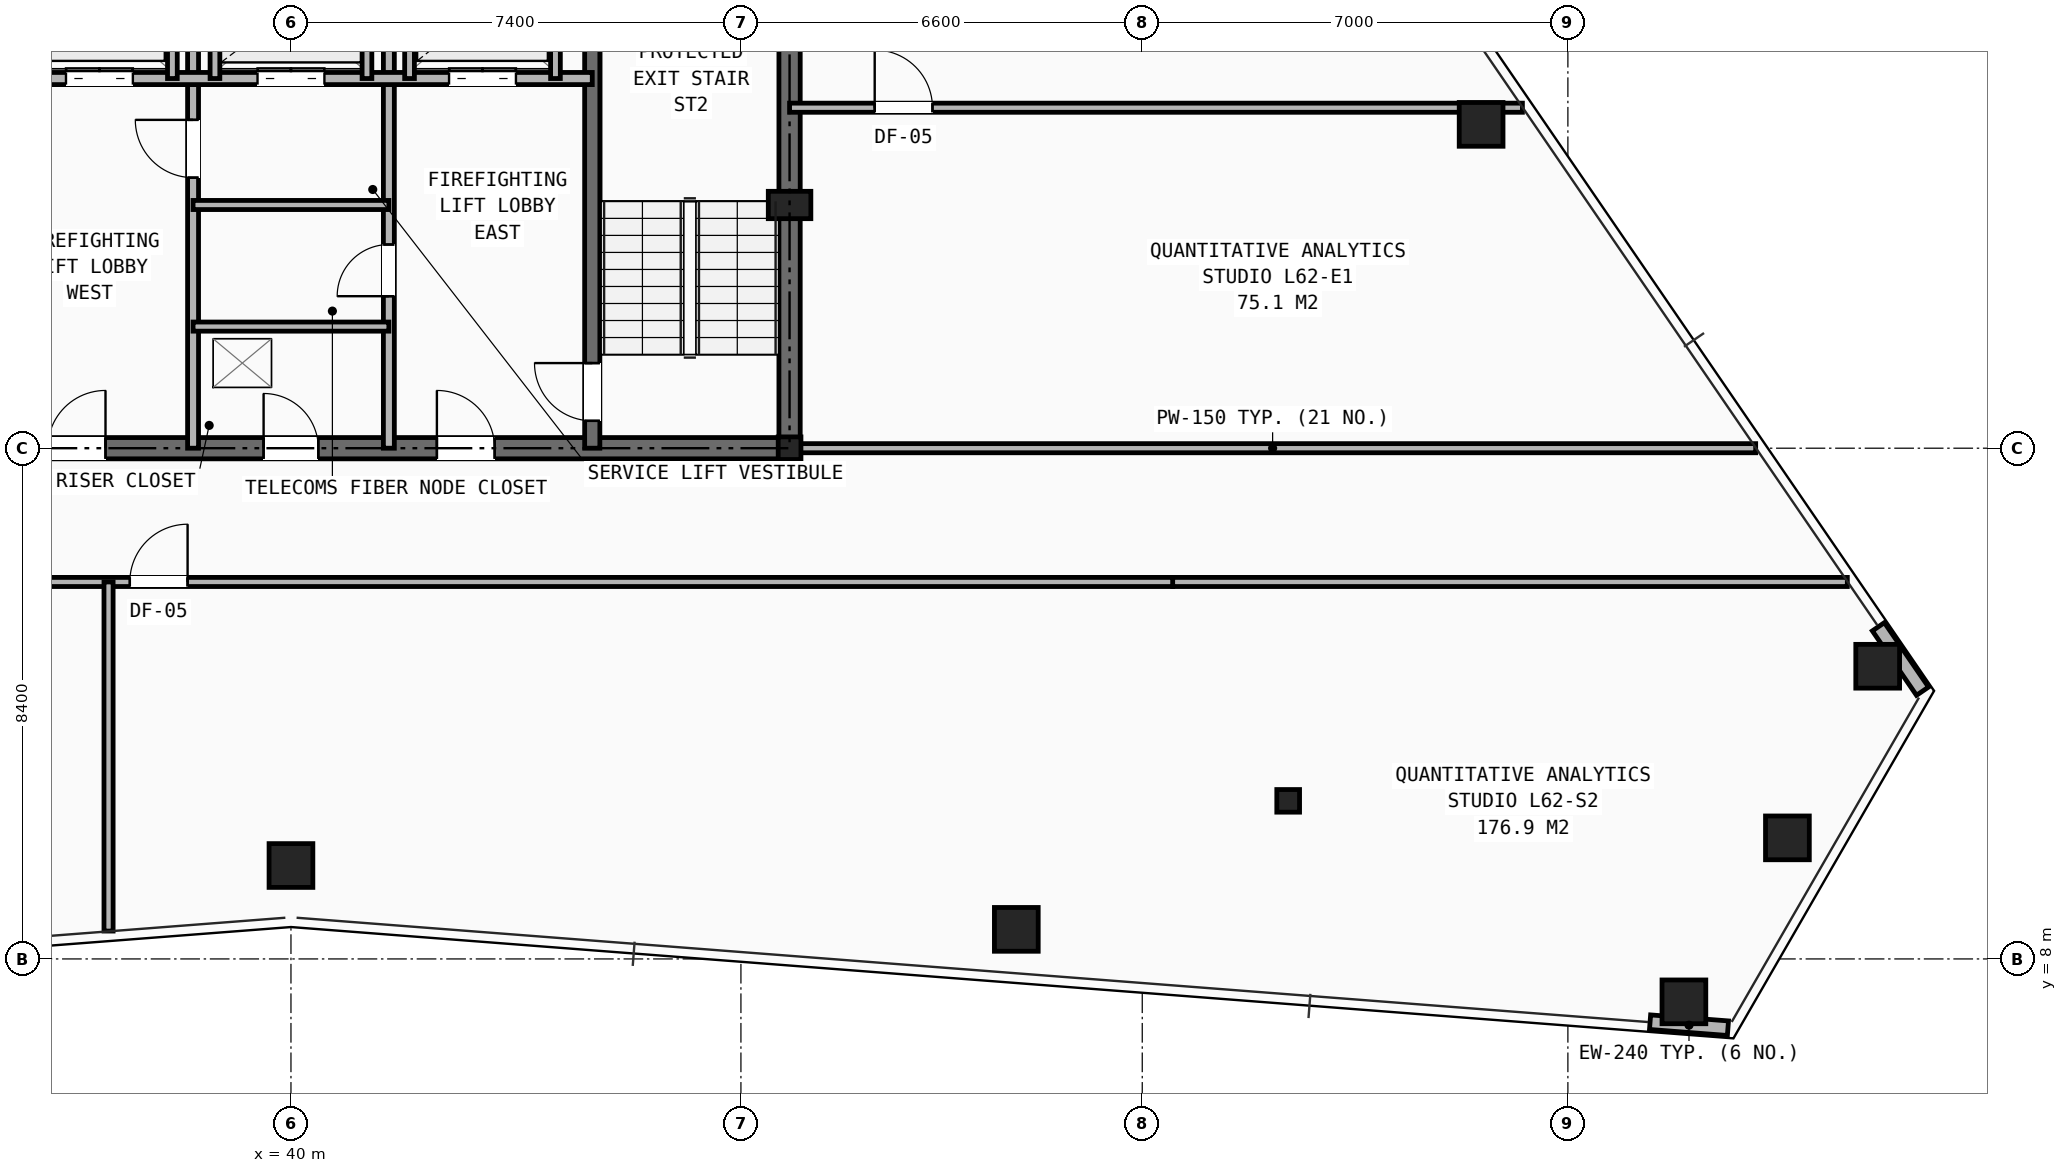
"""IFC4 building model, lengths in metres.
Left out: names, types, materials, properties, quantities, classifications, styles, units other than length and angle.
Written with IfcOpenShell. Run it as: python <this file> out.ifc"""

import sys

from ifc_helpers import new_model, si_unit, direction, frame, frame_2d, origin, origin_2d, place, context, subcontext, project, spatial, rectangle, hollow_rectangle, i_section, extrude, element, fill, save


model = new_model("IFC4")
c1 = context("Model", 3, precision=1e-05, world=origin(), true_north=direction((0.0, 1.0)))
c2 = subcontext(c1, "Body", "Model", "MODEL_VIEW")
j1 = project(units=[si_unit("LENGTHUNIT", "METRE"), si_unit("PLANEANGLEUNIT", "RADIAN")], contexts=[c1])
p1 = place(None, origin())
s1 = spatial("IfcSite", under=j1, at=p1, CompositionType="ELEMENT")
p2 = place(p1, origin())
s2 = spatial("IfcBuilding", under=s1, at=p2, CompositionType="ELEMENT")
p3 = place(p2, frame((0.0, 0.0, 218.9)))
s3 = spatial("IfcBuildingStorey", under=s2, at=p3, CompositionType="ELEMENT", Elevation=218.9)
for number, where, z_axis, x_axis in (
    (1, (48.2, 16.4, 0.0), (0.0, 0.0, 1.0), (1.0, 0.0, 0.0)),
    (2, (56.4, 10.6, 0.0), (0.0, 0.0, 1.0), (1.0, 0.0, 0.0)),
):
    element("IfcColumn", number, at=place(p3, frame(where, z_axis=z_axis, x_axis=x_axis)), inside=s3, PredefinedType="COLUMN", context=c2, shape_type="SweptSolid", body=[
        extrude(i_section(OverallWidth=0.374, OverallDepth=0.372, WebThickness=0.016, FlangeThickness=0.026, at=origin_2d()), origin(), (0.0, 0.0, 1.0), 3.5),
    ])
p4 = place(p3, frame((48.2, 20.4, 0.0), z_axis=(0.0, 0.0, 1.0), x_axis=(1.0, 0.0, 0.0)))
e3 = element("IfcColumn", 3, at=p4, inside=s3, PredefinedType="PILASTER", context=c2, shape_type="SweptSolid", body=[
    extrude(rectangle(XDim=0.7, YDim=0.45, at=origin_2d()), origin(), (0.0, 0.0, 1.0), 3.5),
])
for number, where, z_axis, x_axis in (
    (4, (40.0, 9.537, 0.0), (0.0, 0.0, 1.0), (1.0, 0.0, 0.0)),
    (5, (51.929, 8.486, 0.0), (0.0, 0.0, 1.0), (1.0, 0.0, 0.0)),
    (6, (62.908, 7.294, 0.0), (0.0, 0.0, 1.0), (1.0, 0.0, 0.0)),
    (7, (64.61, 9.991, 0.0), (0.0, 0.0, 1.0), (1.0, 0.0, 0.0)),
    (8, (66.095, 12.814, 0.0), (0.0, 0.0, 1.0), (1.0, 0.0, 0.0)),
    (9, (59.573, 21.726, 0.0), (0.0, 0.0, 1.0), (1.0, 0.0, 0.0)),
):
    element("IfcColumn", number, at=place(p3, frame(where, z_axis=z_axis, x_axis=x_axis)), inside=s3, PredefinedType="COLUMN", context=c2, shape_type="SweptSolid", body=[
        extrude(hollow_rectangle(XDim=0.72, YDim=0.72, WallThickness=0.05, at=origin_2d()), origin(), (0.0, 0.0, 1.0), 3.5),
    ])
p5 = place(p3, frame((62.351, 6.96, 0.0), z_axis=(0.0, 0.0, 1.0), x_axis=(0.997033205721, -0.076972635974, 0.0)))
e10 = element("IfcWall", 10, at=p5, inside=s3, PredefinedType="SHEAR", context=c2, shape_type="SweptSolid", body=[
    extrude(rectangle(XDim=1.285, YDim=0.24, at=frame_2d((0.642, 0.0))), origin(), (0.0, 0.0, 1.0), 2.623),
])
p6 = place(p3, frame((66.832, 12.404, 0.0), z_axis=(0.0, 0.0, 1.0), x_axis=(-0.565269764291, 0.824906111978, 0.0)))
e11 = element("IfcWall", 11, at=p6, inside=s3, PredefinedType="SHEAR", context=c2, shape_type="SweptSolid", body=[
    extrude(rectangle(XDim=1.284, YDim=0.24, at=frame_2d((0.642, 0.0))), origin(), (0.0, 0.0, 1.0), 2.623),
])
p7 = place(p3, frame((31.8, 16.4, 0.0), z_axis=(0.0, 0.0, 1.0), x_axis=(1.0, 0.0, 0.0)))
e12 = element("IfcWall", 12, at=p7, inside=s3, PredefinedType="SHEAR", context=c2, shape_type="SweptSolid", body=[
    extrude(rectangle(XDim=16.4, YDim=0.35, at=frame_2d((8.2, 0.0))), origin(), (0.0, 0.0, 1.0), 3.25),
])
p8 = place(p7, frame((7.75, 0.0, 0.0)))
e13 = element("IfcOpeningElement", 13, at=p8, cuts=e12, PredefinedType="OPENING", context=c2, shape_type="SweptSolid", body=[
    extrude(rectangle(XDim=0.9, YDim=2.1, at=frame_2d((0.45, 1.05))), frame((0.0, 0.185, 0.0), z_axis=(0.0, -1.0, 0.0), x_axis=(1.0, 0.0, 0.0)), (0.0, 0.0, 1.0), 0.37),
])
p9 = place(p7, frame((4.2, 0.0, 0.0)))
e14 = element("IfcOpeningElement", 14, at=p9, cuts=e12, PredefinedType="OPENING", context=c2, shape_type="SweptSolid", body=[
    extrude(rectangle(XDim=0.95, YDim=2.1, at=frame_2d((0.475, 1.05))), frame((0.0, 0.185, 0.0), z_axis=(0.0, -1.0, 0.0), x_axis=(1.0, 0.0, 0.0)), (0.0, 0.0, 1.0), 0.37),
])
p10 = place(p7, frame((10.6, 0.0, 0.0)))
e15 = element("IfcOpeningElement", 15, at=p10, cuts=e12, PredefinedType="OPENING", context=c2, shape_type="SweptSolid", body=[
    extrude(rectangle(XDim=0.95, YDim=2.1, at=frame_2d((0.475, 1.05))), frame((0.0, 0.185, 0.0), z_axis=(0.0, -1.0, 0.0), x_axis=(1.0, 0.0, 0.0)), (0.0, 0.0, 1.0), 0.37),
])
p11 = place(p3, frame((48.2, 16.4, 0.0), z_axis=(0.0, 0.0, 1.0), x_axis=(0.0, 1.0, 0.0)))
e16 = element("IfcWall", 16, at=p11, inside=s3, PredefinedType="SHEAR", context=c2, shape_type="SweptSolid", body=[
    extrude(rectangle(XDim=14.8, YDim=0.35, at=frame_2d((7.4, 0.0))), origin(), (0.0, 0.0, 1.0), 3.25),
])
p12 = place(p11, frame((11.0, 0.0, 0.0)))
e17 = element("IfcOpeningElement", 17, at=p12, cuts=e16, PredefinedType="OPENING", context=c2, shape_type="SweptSolid", body=[
    extrude(rectangle(XDim=1.1, YDim=2.15, at=frame_2d((0.55, 1.075))), frame((0.0, 0.185, 0.0), z_axis=(0.0, -1.0, 0.0), x_axis=(1.0, 0.0, 0.0)), (0.0, 0.0, 1.0), 0.37),
])
p13 = place(p3, frame((44.955, 16.4, 0.0), z_axis=(0.0, 0.0, 1.0), x_axis=(0.0, 1.0, 0.0)))
e18 = element("IfcWall", 18, at=p13, inside=s3, PredefinedType="SHEAR", context=c2, shape_type="SweptSolid", body=[
    extrude(rectangle(XDim=8.4, YDim=0.25, at=frame_2d((4.2, 0.0))), origin(), (0.0, 0.0, 1.0), 3.25),
])
p14 = place(p13, frame((0.45, 0.0, 0.0)))
e19 = element("IfcOpeningElement", 19, at=p14, cuts=e18, PredefinedType="OPENING", context=c2, shape_type="SweptSolid", body=[
    extrude(rectangle(XDim=0.95, YDim=2.1, at=frame_2d((0.475, 1.05))), frame((0.0, 0.135, 0.0), z_axis=(0.0, -1.0, 0.0), x_axis=(1.0, 0.0, 0.0)), (0.0, 0.0, 1.0), 0.27),
])
p15 = place(p3, frame((38.39, 16.4, 0.0), z_axis=(0.0, 0.0, 1.0), x_axis=(0.0, 1.0, 0.0)))
e20 = element("IfcWall", 20, at=p15, inside=s3, PredefinedType="PARTITIONING", context=c2, shape_type="SweptSolid", body=[
    extrude(rectangle(XDim=8.4, YDim=0.18, at=frame_2d((4.2, 0.0))), origin(), (0.0, 0.0, 1.0), 2.705),
])
p16 = place(p15, frame((4.45, 0.0, 0.0)))
e21 = element("IfcOpeningElement", 21, at=p16, cuts=e20, PredefinedType="OPENING", context=c2, shape_type="SweptSolid", body=[
    extrude(rectangle(XDim=0.95, YDim=2.1, at=frame_2d((0.475, 1.05))), frame((0.0, 0.1, 0.0), z_axis=(0.0, -1.0, 0.0), x_axis=(1.0, 0.0, 0.0)), (0.0, 0.0, 1.0), 0.2),
])
p17 = place(p3, frame((41.61, 16.4, 0.0), z_axis=(0.0, 0.0, 1.0), x_axis=(0.0, 1.0, 0.0)))
e22 = element("IfcWall", 22, at=p17, inside=s3, PredefinedType="PARTITIONING", context=c2, shape_type="SweptSolid", body=[
    extrude(rectangle(XDim=8.4, YDim=0.18, at=frame_2d((4.2, 0.0))), origin(), (0.0, 0.0, 1.0), 2.705),
])
p18 = place(p17, frame((2.5, 0.0, 0.0)))
e23 = element("IfcOpeningElement", 23, at=p18, cuts=e22, PredefinedType="OPENING", context=c2, shape_type="SweptSolid", body=[
    extrude(rectangle(XDim=0.85, YDim=2.05, at=frame_2d((0.425, 1.025))), frame((0.0, 0.1, 0.0), z_axis=(0.0, -1.0, 0.0), x_axis=(1.0, 0.0, 0.0)), (0.0, 0.0, 1.0), 0.2),
])
p19 = place(p3, frame((35.045, 22.48, 0.0), z_axis=(0.0, 0.0, 1.0), x_axis=(1.0, 0.0, 0.0)))
e24 = element("IfcWall", 24, at=p19, inside=s3, PredefinedType="SOLIDWALL", context=c2, shape_type="SweptSolid", body=[
    extrude(rectangle(XDim=9.91, YDim=0.2, at=frame_2d((4.955, 0.0))), origin(), (0.0, 0.0, 1.0), 3.25),
])
p20 = place(p19, frame((1.255, 0.0, 0.0)))
e25 = element("IfcOpeningElement", 25, at=p20, cuts=e24, PredefinedType="OPENING", context=c2, shape_type="SweptSolid", body=[
    extrude(rectangle(XDim=1.1, YDim=2.15, at=frame_2d((0.55, 1.075))), frame((0.0, 0.11, 0.0), z_axis=(0.0, -1.0, 0.0), x_axis=(1.0, 0.0, 0.0)), (0.0, 0.0, 1.0), 0.22),
])
p21 = place(p19, frame((7.555, 0.0, 0.0)))
e26 = element("IfcOpeningElement", 26, at=p21, cuts=e24, PredefinedType="OPENING", context=c2, shape_type="SweptSolid", body=[
    extrude(rectangle(XDim=1.1, YDim=2.15, at=frame_2d((0.55, 1.075))), frame((0.0, 0.11, 0.0), z_axis=(0.0, -1.0, 0.0), x_axis=(1.0, 0.0, 0.0)), (0.0, 0.0, 1.0), 0.22),
])
p22 = place(p19, frame((4.405, 0.0, 0.0)))
e27 = element("IfcOpeningElement", 27, at=p22, cuts=e24, PredefinedType="OPENING", context=c2, shape_type="SweptSolid", body=[
    extrude(rectangle(XDim=1.1, YDim=2.15, at=frame_2d((0.55, 1.075))), frame((0.0, 0.11, 0.0), z_axis=(0.0, -1.0, 0.0), x_axis=(1.0, 0.0, 0.0)), (0.0, 0.0, 1.0), 0.22),
])
for number, where, z_axis, x_axis in (
    (28, (38.39, 18.4, 0.0), (0.0, 0.0, 1.0), (1.0, 0.0, 0.0)),
    (29, (38.39, 20.4, 0.0), (0.0, 0.0, 1.0), (1.0, 0.0, 0.0)),
):
    element("IfcWall", number, at=place(p3, frame(where, z_axis=z_axis, x_axis=x_axis)), inside=s3, PredefinedType="PARTITIONING", context=c2, shape_type="SweptSolid", body=[
        extrude(rectangle(XDim=3.22, YDim=0.15, at=frame_2d((1.61, 0.0))), origin(), (0.0, 0.0, 1.0), 3.25),
    ])
for number, where, z_axis, x_axis in (
    (30, (38.05, 22.48, 0.0), (0.0, 0.0, 1.0), (0.0, 1.0, 0.0)),
    (31, (41.95, 22.48, 0.0), (0.0, 0.0, 1.0), (0.0, 1.0, 0.0)),
    (32, (44.35, 22.48, 0.0), (0.0, 0.0, 1.0), (0.0, 1.0, 0.0)),
    (33, (38.75, 22.48, 0.0), (0.0, 0.0, 1.0), (0.0, 1.0, 0.0)),
    (34, (41.25, 22.48, 0.0), (0.0, 0.0, 1.0), (0.0, 1.0, 0.0)),
):
    element("IfcWall", number, at=place(p3, frame(where, z_axis=z_axis, x_axis=x_axis)), inside=s3, PredefinedType="SOLIDWALL", context=c2, shape_type="SweptSolid", body=[
        extrude(rectangle(XDim=2.32, YDim=0.16, at=frame_2d((1.16, 0.0))), origin(), (0.0, 0.0, 1.0), 3.25),
    ])
p23 = place(p3, frame((54.5, 14.2, 0.0), z_axis=(0.0, 0.0, 1.0), x_axis=(1.0, 0.0, 0.0)))
e35 = element("IfcWall", 35, at=p23, inside=s3, PredefinedType="PARTITIONING", context=c2, shape_type="SweptSolid", body=[
    extrude(rectangle(XDim=11.095, YDim=0.15, at=frame_2d((5.548, 0.0))), origin(), (0.0, 0.0, 1.0), 2.292),
])
p24 = place(p3, frame((48.2, 16.4, 0.0), z_axis=(0.0, 0.0, 1.0), x_axis=(1.0, 0.0, 0.0)))
e36 = element("IfcWall", 36, at=p24, inside=s3, PredefinedType="PARTITIONING", context=c2, shape_type="SweptSolid", body=[
    extrude(rectangle(XDim=15.888, YDim=0.15, at=frame_2d((7.944, 0.0))), origin(), (0.0, 0.0, 1.0), 2.292),
])
p25 = place(p3, frame((25.5, 14.2, 0.0), z_axis=(0.0, 0.0, 1.0), x_axis=(1.0, 0.0, 0.0)))
e37 = element("IfcWall", 37, at=p25, inside=s3, PredefinedType="PARTITIONING", context=c2, shape_type="SweptSolid", body=[
    extrude(rectangle(XDim=29.0, YDim=0.15, at=frame_2d((14.5, 0.0))), origin(), (0.0, 0.0, 1.0), 2.292),
])
p26 = place(p25, frame((0.85, 0.0, 0.0)))
e38 = element("IfcOpeningElement", 38, at=p26, cuts=e37, PredefinedType="OPENING", context=c2, shape_type="SweptSolid", body=[
    extrude(rectangle(XDim=0.95, YDim=2.1, at=frame_2d((0.475, 1.05))), frame((0.0, 0.085, 0.0), z_axis=(0.0, -1.0, 0.0), x_axis=(1.0, 0.0, 0.0)), (0.0, 0.0, 1.0), 0.17),
])
p27 = place(p25, frame((11.85, 0.0, 0.0)))
e39 = element("IfcOpeningElement", 39, at=p27, cuts=e37, PredefinedType="OPENING", context=c2, shape_type="SweptSolid", body=[
    extrude(rectangle(XDim=0.95, YDim=2.1, at=frame_2d((0.475, 1.05))), frame((0.0, 0.085, 0.0), z_axis=(0.0, -1.0, 0.0), x_axis=(1.0, 0.0, 0.0)), (0.0, 0.0, 1.0), 0.17),
])
p28 = place(p3, frame((37.0, 8.458, 0.0), z_axis=(0.0, 0.0, 1.0), x_axis=(0.0, 1.0, 0.0)))
e40 = element("IfcWall", 40, at=p28, inside=s3, PredefinedType="PARTITIONING", context=c2, shape_type="SweptSolid", body=[
    extrude(rectangle(XDim=5.741, YDim=0.15, at=frame_2d((2.871, 0.0))), origin(), (0.0, 0.0, 1.0), 2.292),
])
p29 = place(p3, frame((48.2, 22.0, 0.0), z_axis=(0.0, 0.0, 1.0), x_axis=(1.0, 0.0, 0.0)))
e41 = element("IfcWall", 41, at=p29, inside=s3, PredefinedType="PARTITIONING", context=c2, shape_type="SweptSolid", body=[
    extrude(rectangle(XDim=12.052, YDim=0.15, at=frame_2d((6.026, 0.0))), origin(), (0.0, 0.0, 1.0), 2.292),
])
p30 = place(p29, frame((1.4, 0.0, 0.0)))
e42 = element("IfcOpeningElement", 42, at=p30, cuts=e41, PredefinedType="OPENING", context=c2, shape_type="SweptSolid", body=[
    extrude(rectangle(XDim=0.95, YDim=2.1, at=frame_2d((0.475, 1.05))), frame((0.0, 0.085, 0.0), z_axis=(0.0, -1.0, 0.0), x_axis=(1.0, 0.0, 0.0)), (0.0, 0.0, 1.0), 0.17),
])
p31 = place(p8, origin())
e43 = element("IfcDoor", 43, at=p31, inside=s3, OperationType="SINGLE_SWING_LEFT", PredefinedType="DOOR", context=c2, shape_type="SweptSolid", body=[
    extrude(rectangle(XDim=0.9, YDim=2.1, at=frame_2d((0.45, 1.05))), frame((0.0, 0.025, 0.0), z_axis=(0.0, -1.0, 0.0), x_axis=(1.0, 0.0, 0.0)), (0.0, 0.0, 1.0), 0.05),
])
fill(e13, e43)
p32 = place(p18, origin())
e44 = element("IfcDoor", 44, at=p32, inside=s3, OperationType="SINGLE_SWING_LEFT", PredefinedType="DOOR", context=c2, shape_type="SweptSolid", body=[
    extrude(rectangle(XDim=0.85, YDim=2.05, at=frame_2d((0.425, 1.025))), frame((0.0, 0.025, 0.0), z_axis=(0.0, -1.0, 0.0), x_axis=(1.0, 0.0, 0.0)), (0.0, 0.0, 1.0), 0.05),
])
fill(e23, e44)
p33 = place(p16, origin())
e45 = element("IfcDoor", 45, at=p33, inside=s3, OperationType="SINGLE_SWING_RIGHT", PredefinedType="DOOR", context=c2, shape_type="SweptSolid", body=[
    extrude(rectangle(XDim=0.95, YDim=2.1, at=frame_2d((0.475, 1.05))), frame((0.0, 0.025, 0.0), z_axis=(0.0, -1.0, 0.0), x_axis=(1.0, 0.0, 0.0)), (0.0, 0.0, 1.0), 0.05),
])
fill(e21, e45)
p34 = place(p14, origin())
e46 = element("IfcDoor", 46, at=p34, inside=s3, OperationType="SINGLE_SWING_RIGHT", PredefinedType="DOOR", context=c2, shape_type="SweptSolid", body=[
    extrude(rectangle(XDim=0.95, YDim=2.1, at=frame_2d((0.475, 1.05))), frame((0.0, 0.025, 0.0), z_axis=(0.0, -1.0, 0.0), x_axis=(1.0, 0.0, 0.0)), (0.0, 0.0, 1.0), 0.05),
])
fill(e19, e46)
p35 = place(p9, origin())
e47 = element("IfcDoor", 47, at=p35, inside=s3, OperationType="SINGLE_SWING_RIGHT", PredefinedType="DOOR", context=c2, shape_type="SweptSolid", body=[
    extrude(rectangle(XDim=0.95, YDim=2.1, at=frame_2d((0.475, 1.05))), frame((0.0, 0.025, 0.0), z_axis=(0.0, -1.0, 0.0), x_axis=(1.0, 0.0, 0.0)), (0.0, 0.0, 1.0), 0.05),
])
fill(e14, e47)
p36 = place(p10, origin())
e48 = element("IfcDoor", 48, at=p36, inside=s3, OperationType="SINGLE_SWING_LEFT", PredefinedType="DOOR", context=c2, shape_type="SweptSolid", body=[
    extrude(rectangle(XDim=0.95, YDim=2.1, at=frame_2d((0.475, 1.05))), frame((0.0, 0.025, 0.0), z_axis=(0.0, -1.0, 0.0), x_axis=(1.0, 0.0, 0.0)), (0.0, 0.0, 1.0), 0.05),
])
fill(e15, e48)
p37 = place(p20, origin())
e49 = element("IfcDoor", 49, at=p37, inside=s3, OperationType="DOUBLE_DOOR_SLIDING", PredefinedType="DOOR", context=c2, shape_type="SweptSolid", body=[
    extrude(rectangle(XDim=1.1, YDim=2.15, at=frame_2d((0.55, 1.075))), frame((0.0, 0.025, 0.0), z_axis=(0.0, -1.0, 0.0), x_axis=(1.0, 0.0, 0.0)), (0.0, 0.0, 1.0), 0.05),
])
fill(e25, e49)
p38 = place(p21, origin())
e50 = element("IfcDoor", 50, at=p38, inside=s3, OperationType="DOUBLE_DOOR_SLIDING", PredefinedType="DOOR", context=c2, shape_type="SweptSolid", body=[
    extrude(rectangle(XDim=1.1, YDim=2.15, at=frame_2d((0.55, 1.075))), frame((0.0, 0.025, 0.0), z_axis=(0.0, -1.0, 0.0), x_axis=(1.0, 0.0, 0.0)), (0.0, 0.0, 1.0), 0.05),
])
fill(e26, e50)
p39 = place(p22, origin())
e51 = element("IfcDoor", 51, at=p39, inside=s3, OperationType="DOUBLE_DOOR_SLIDING", PredefinedType="DOOR", context=c2, shape_type="SweptSolid", body=[
    extrude(rectangle(XDim=1.1, YDim=2.15, at=frame_2d((0.55, 1.075))), frame((0.0, 0.025, 0.0), z_axis=(0.0, -1.0, 0.0), x_axis=(1.0, 0.0, 0.0)), (0.0, 0.0, 1.0), 0.05),
])
fill(e27, e51)
p40 = place(p27, origin())
e52 = element("IfcDoor", 52, at=p40, inside=s3, OperationType="SINGLE_SWING_RIGHT", PredefinedType="DOOR", context=c2, shape_type="SweptSolid", body=[
    extrude(rectangle(XDim=0.95, YDim=2.1, at=frame_2d((0.475, 1.05))), frame((0.0, 0.025, 0.0), z_axis=(0.0, -1.0, 0.0), x_axis=(1.0, 0.0, 0.0)), (0.0, 0.0, 1.0), 0.05),
])
fill(e39, e52)
p41 = place(p30, origin())
e53 = element("IfcDoor", 53, at=p41, inside=s3, OperationType="SINGLE_SWING_LEFT", PredefinedType="DOOR", context=c2, shape_type="SweptSolid", body=[
    extrude(rectangle(XDim=0.95, YDim=2.1, at=frame_2d((0.475, 1.05))), frame((0.0, 0.025, 0.0), z_axis=(0.0, -1.0, 0.0), x_axis=(1.0, 0.0, 0.0)), (0.0, 0.0, 1.0), 0.05),
])
fill(e42, e53)
save(model, sys.argv[1])
